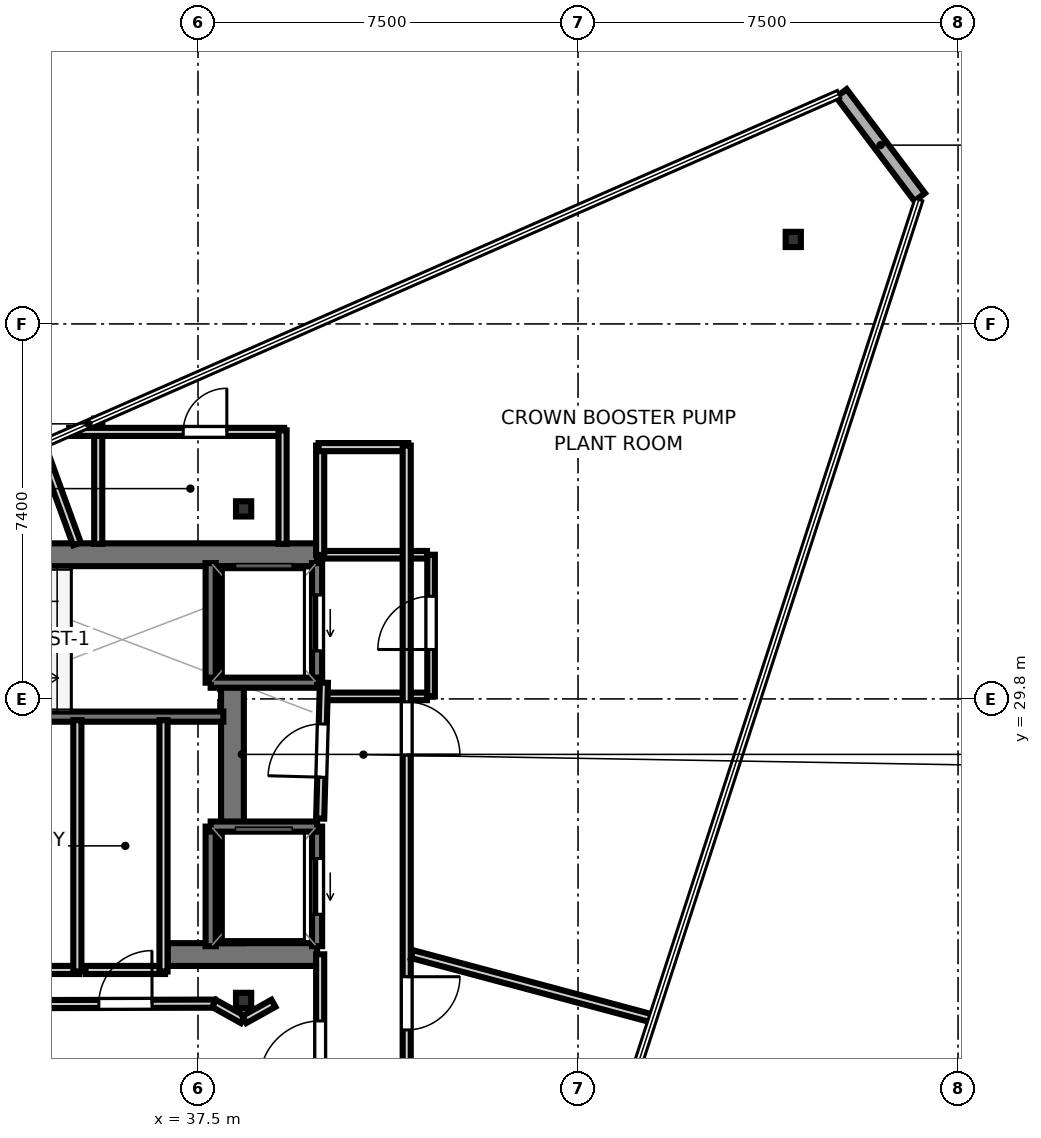
"""IFC4 building model, lengths in metres.
Left out: names, types, materials, properties, quantities, classifications, styles, units other than length and angle.
Written with IfcOpenShell. Run it as: python <this file> out.ifc"""

import sys

from ifc_helpers import new_model, si_unit, direction, frame, frame_2d, origin, origin_2d, place, context, subcontext, project, spatial, rectangle, i_section, extrude, element, fill, save


model = new_model("IFC4")
c1 = context("Model", 3, precision=1e-05, world=origin(), true_north=direction((0.0, 1.0)))
c2 = subcontext(c1, "Body", "Model", "MODEL_VIEW")
j1 = project(units=[si_unit("LENGTHUNIT", "METRE"), si_unit("PLANEANGLEUNIT", "RADIAN")], contexts=[c1])
p1 = place(None, origin())
s1 = spatial("IfcSite", under=j1, at=p1, CompositionType="ELEMENT")
p2 = place(p1, origin())
s2 = spatial("IfcBuilding", under=s1, at=p2, CompositionType="ELEMENT")
p3 = place(p2, frame((0.0, 0.0, 371.3)))
s3 = spatial("IfcBuildingStorey", under=s2, at=p3, CompositionType="ELEMENT", Elevation=371.3)
p4 = place(p3, frame((30.83, 32.645, 0.0), z_axis=(0.0, 0.0, 1.0), x_axis=(1.0, 0.0, 0.0)))
e1 = element("IfcWall", 1, at=p4, inside=s3, PredefinedType="SHEAR", context=c2, shape_type="SweptSolid", body=[
    extrude(rectangle(XDim=9.02, YDim=0.45, at=frame_2d((4.51, 0.0))), origin(), (0.0, 0.0, 1.0), 3.55),
])
p5 = place(p3, frame((36.9, 24.755, 0.0), z_axis=(0.0, 0.0, 1.0), x_axis=(1.0, 0.0, 0.0)))
e2 = element("IfcWall", 2, at=p5, inside=s3, PredefinedType="SHEAR", context=c2, shape_type="SweptSolid", body=[
    extrude(rectangle(XDim=2.95, YDim=0.45, at=frame_2d((1.475, 0.0))), origin(), (0.0, 0.0, 1.0), 3.55),
])
p6 = place(p3, frame((38.18, 24.98, 0.0), z_axis=(0.0, 0.0, 1.0), x_axis=(0.0, 1.0, 0.0)))
e3 = element("IfcWall", 3, at=p6, inside=s3, PredefinedType="SHEAR", context=c2, shape_type="SweptSolid", body=[
    extrude(rectangle(XDim=7.44, YDim=0.45, at=frame_2d((3.72, 0.0))), origin(), (0.0, 0.0, 1.0), 3.55),
])
for number, where, z_axis, x_axis in (
    (4, (38.4, 33.55, 0.0), (0.0, 0.0, 1.0), (1.0, 0.0, 0.0)),
    (5, (38.4, 23.85, 0.0), (0.0, 0.0, 1.0), (1.0, 0.0, 0.0)),
    (6, (49.248, 38.867, 0.0), (0.0, 0.0, 1.0), (1.0, 0.0, 0.0)),
):
    element("IfcColumn", number, at=place(p3, frame(where, z_axis=z_axis, x_axis=x_axis)), inside=s3, PredefinedType="COLUMN", context=c2, shape_type="SweptSolid", body=[
        extrude(i_section(OverallWidth=0.3, OverallDepth=0.3, WebThickness=0.01, FlangeThickness=0.015, at=origin_2d()), origin(), (0.0, 0.0, 1.0), 3.75),
    ])
p7 = place(p3, frame((51.744, 39.702, 0.0), z_axis=(0.0, 0.0, 1.0), x_axis=(-0.601640351367, 0.798767104736, 0.0)))
e7 = element("IfcWall", 7, at=p7, inside=s3, PredefinedType="SOLIDWALL", context=c2, shape_type="SweptSolid", body=[
    extrude(rectangle(XDim=2.57, YDim=0.26, at=frame_2d((1.285, 0.0))), origin(), (0.0, 0.0, 1.0), 3.55),
])
p8 = place(p3, frame((29.7, 29.45, 0.0), z_axis=(0.0, 0.0, 1.0), x_axis=(1.0, 0.0, 0.0)))
e8 = element("IfcWall", 8, at=p8, inside=s3, PredefinedType="SOLIDWALL", context=c2, shape_type="SweptSolid", body=[
    extrude(rectangle(XDim=8.3, YDim=0.2, at=frame_2d((4.15, 0.0))), origin(), (0.0, 0.0, 1.0), 3.55),
])
p9 = place(p8, frame((0.595, 0.0, 0.0)))
e9 = element("IfcOpeningElement", 9, at=p9, cuts=e8, PredefinedType="OPENING", context=c2, shape_type="SweptSolid", body=[
    extrude(rectangle(XDim=1.25, YDim=2.15, at=frame_2d((0.625, 1.075))), frame((0.0, 0.11, 0.0), z_axis=(0.0, -1.0, 0.0), x_axis=(1.0, 0.0, 0.0)), (0.0, 0.0, 1.0), 0.22),
])
p10 = place(p3, frame((39.85, 30.12, 0.0), z_axis=(0.0, 0.0, 1.0), x_axis=(0.0, 1.0, 0.0)))
e10 = element("IfcWall", 10, at=p10, inside=s3, PredefinedType="SOLIDWALL", context=c2, shape_type="SweptSolid", body=[
    extrude(rectangle(XDim=2.36, YDim=0.2, at=frame_2d((1.18, 0.0))), origin(), (0.0, 0.0, 1.0), 3.55),
])
p11 = place(p10, frame((0.63, 0.0, 0.0)))
e11 = element("IfcOpeningElement", 11, at=p11, cuts=e10, PredefinedType="OPENING", context=c2, shape_type="SweptSolid", body=[
    extrude(rectangle(XDim=1.1, YDim=2.15, at=frame_2d((0.55, 1.075))), frame((0.0, 0.11, 0.0), z_axis=(0.0, -1.0, 0.0), x_axis=(1.0, 0.0, 0.0)), (0.0, 0.0, 1.0), 0.22),
])
p12 = place(p3, frame((37.75, 30.12, 0.0), z_axis=(0.0, 0.0, 1.0), x_axis=(0.0, 1.0, 0.0)))
e12 = element("IfcWall", 12, at=p12, inside=s3, PredefinedType="SOLIDWALL", context=c2, shape_type="SweptSolid", body=[
    extrude(rectangle(XDim=2.36, YDim=0.2, at=frame_2d((1.18, 0.0))), origin(), (0.0, 0.0, 1.0), 3.55),
])
p13 = place(p3, frame((37.75, 30.12, 0.0), z_axis=(0.0, 0.0, 1.0), x_axis=(1.0, 0.0, 0.0)))
e13 = element("IfcWall", 13, at=p13, inside=s3, PredefinedType="SOLIDWALL", context=c2, shape_type="SweptSolid", body=[
    extrude(rectangle(XDim=2.1, YDim=0.2, at=frame_2d((1.05, 0.0))), origin(), (0.0, 0.0, 1.0), 3.55),
])
p14 = place(p3, frame((39.85, 24.92, 0.0), z_axis=(0.0, 0.0, 1.0), x_axis=(0.0, 1.0, 0.0)))
e14 = element("IfcWall", 14, at=p14, inside=s3, PredefinedType="SOLIDWALL", context=c2, shape_type="SweptSolid", body=[
    extrude(rectangle(XDim=2.36, YDim=0.2, at=frame_2d((1.18, 0.0))), origin(), (0.0, 0.0, 1.0), 3.55),
])
p15 = place(p14, frame((0.63, 0.0, 0.0)))
e15 = element("IfcOpeningElement", 15, at=p15, cuts=e14, PredefinedType="OPENING", context=c2, shape_type="SweptSolid", body=[
    extrude(rectangle(XDim=1.1, YDim=2.15, at=frame_2d((0.55, 1.075))), frame((0.0, 0.11, 0.0), z_axis=(0.0, -1.0, 0.0), x_axis=(1.0, 0.0, 0.0)), (0.0, 0.0, 1.0), 0.22),
])
p16 = place(p3, frame((37.75, 24.92, 0.0), z_axis=(0.0, 0.0, 1.0), x_axis=(0.0, 1.0, 0.0)))
e16 = element("IfcWall", 16, at=p16, inside=s3, PredefinedType="SOLIDWALL", context=c2, shape_type="SweptSolid", body=[
    extrude(rectangle(XDim=2.36, YDim=0.2, at=frame_2d((1.18, 0.0))), origin(), (0.0, 0.0, 1.0), 3.55),
])
p17 = place(p3, frame((37.75, 27.28, 0.0), z_axis=(0.0, 0.0, 1.0), x_axis=(1.0, 0.0, 0.0)))
e17 = element("IfcWall", 17, at=p17, inside=s3, PredefinedType="SOLIDWALL", context=c2, shape_type="SweptSolid", body=[
    extrude(rectangle(XDim=2.1, YDim=0.2, at=frame_2d((1.05, 0.0))), origin(), (0.0, 0.0, 1.0), 3.55),
])
p18 = place(p3, frame((42.1, 29.85, 0.0), z_axis=(0.0, 0.0, 1.0), x_axis=(0.0, 1.0, 0.0)))
e18 = element("IfcWall", 18, at=p18, inside=s3, PredefinedType="PARTITIONING", context=c2, shape_type="SweptSolid", body=[
    extrude(rectangle(XDim=2.795, YDim=0.15, at=frame_2d((1.397, 0.0))), origin(), (0.0, 0.0, 1.0), 2.87),
])
p19 = place(p18, frame((0.925, 0.0, 0.0)))
e19 = element("IfcOpeningElement", 19, at=p19, cuts=e18, PredefinedType="OPENING", context=c2, shape_type="SweptSolid", body=[
    extrude(rectangle(XDim=1.05, YDim=2.15, at=frame_2d((0.525, 1.075))), frame((0.0, 0.085, 0.0), z_axis=(0.0, -1.0, 0.0), x_axis=(1.0, 0.0, 0.0)), (0.0, 0.0, 1.0), 0.17),
])
for number, where, z_axis, x_axis in (
    (20, (39.96, 29.85, 0.0), (0.0, 0.0, 1.0), (1.0, 0.0, 0.0)),
    (21, (39.96, 32.645, 0.0), (0.0, 0.0, 1.0), (1.0, 0.0, 0.0)),
):
    element("IfcWall", number, at=place(p3, frame(where, z_axis=z_axis, x_axis=x_axis)), inside=s3, PredefinedType="PARTITIONING", context=c2, shape_type="SweptSolid", body=[
        extrude(rectangle(XDim=2.06, YDim=0.15, at=frame_2d((1.03, 0.0))), origin(), (0.0, 0.0, 1.0), 2.87),
    ])
p20 = place(p3, frame((35.15, 24.451, 0.0), z_axis=(0.0, 0.0, 1.0), x_axis=(-1.0, 0.0, 0.0)))
e22 = element("IfcWall", 22, at=p20, inside=s3, PredefinedType="PARTITIONING", context=c2, shape_type="SweptSolid", body=[
    extrude(rectangle(XDim=5.55, YDim=0.16, at=frame_2d((2.775, 0.0))), origin(), (0.0, 0.0, 1.0), 2.87),
])
p21 = place(p3, frame((35.119, 29.38, 0.0), z_axis=(0.0, 0.0, 1.0), x_axis=(0.0, -1.0, 0.0)))
e23 = element("IfcWall", 23, at=p21, inside=s3, PredefinedType="PARTITIONING", context=c2, shape_type="SweptSolid", body=[
    extrude(rectangle(XDim=4.96, YDim=0.16, at=frame_2d((2.48, 0.0))), origin(), (0.0, 0.0, 1.0), 2.08),
])
p22 = place(p3, frame((39.911, 22.05, 0.0), z_axis=(0.0, 0.0, 1.0), x_axis=(0.0, 1.0, 0.0)))
e24 = element("IfcWall", 24, at=p22, inside=s3, PredefinedType="PARTITIONING", context=c2, shape_type="SweptSolid", body=[
    extrude(rectangle(XDim=2.71, YDim=0.16, at=frame_2d((1.355, 0.0))), origin(), (0.0, 0.0, 1.0), 2.87),
])
p23 = place(p22, frame((0.195, 0.0, 0.0)))
e25 = element("IfcOpeningElement", 25, at=p23, cuts=e24, PredefinedType="OPENING", context=c2, shape_type="SweptSolid", body=[
    extrude(rectangle(XDim=1.2, YDim=2.15, at=frame_2d((0.6, 1.075))), frame((0.0, 0.09, 0.0), z_axis=(0.0, -1.0, 0.0), x_axis=(1.0, 0.0, 0.0)), (0.0, 0.0, 1.0), 0.18),
])
p24 = place(p3, frame((39.911, 27.439, 0.0), z_axis=(0.0, 0.0, 1.0), x_axis=(0.027673579092, 0.999617013171, 0.0)))
e26 = element("IfcWall", 26, at=p24, inside=s3, PredefinedType="PARTITIONING", context=c2, shape_type="SweptSolid", body=[
    extrude(rectangle(XDim=2.682, YDim=0.16, at=frame_2d((1.341, 0.0))), origin(), (0.0, 0.0, 1.0), 2.87),
])
p25 = place(p24, frame((0.816, 0.0, 0.0)))
e27 = element("IfcOpeningElement", 27, at=p25, cuts=e26, PredefinedType="OPENING", context=c2, shape_type="SweptSolid", body=[
    extrude(rectangle(XDim=1.05, YDim=2.15, at=frame_2d((0.525, 1.075))), frame((0.0, 0.09, 0.0), z_axis=(0.0, -1.0, 0.0), x_axis=(1.0, 0.0, 0.0)), (0.0, 0.0, 1.0), 0.18),
])
p26 = place(p3, frame((39.911, 32.64, 0.0), z_axis=(0.0, 0.0, 1.0), x_axis=(0.0, 1.0, 0.0)))
e28 = element("IfcWall", 28, at=p26, inside=s3, PredefinedType="PARTITIONING", context=c2, shape_type="SweptSolid", body=[
    extrude(rectangle(XDim=2.16, YDim=0.16, at=frame_2d((1.08, 0.0))), origin(), (0.0, 0.0, 1.0), 2.87),
])
p27 = place(p3, frame((39.88, 34.769, 0.0), z_axis=(0.0, 0.0, 1.0), x_axis=(1.0, 0.0, 0.0)))
e29 = element("IfcWall", 29, at=p27, inside=s3, PredefinedType="PARTITIONING", context=c2, shape_type="SweptSolid", body=[
    extrude(rectangle(XDim=1.77, YDim=0.16, at=frame_2d((0.885, 0.0))), origin(), (0.0, 0.0, 1.0), 2.87),
])
p28 = place(p3, frame((41.619, 34.8, 0.0), z_axis=(0.0, 0.0, 1.0), x_axis=(0.0, -1.0, 0.0)))
e30 = element("IfcWall", 30, at=p28, inside=s3, PredefinedType="PARTITIONING", context=c2, shape_type="SweptSolid", body=[
    extrude(rectangle(XDim=12.75, YDim=0.16, at=frame_2d((6.375, 0.0))), origin(), (0.0, 0.0, 1.0), 2.87),
])
p29 = place(p28, frame((10.482, 0.0, 0.0)))
e31 = element("IfcOpeningElement", 31, at=p29, cuts=e30, PredefinedType="OPENING", context=c2, shape_type="SweptSolid", body=[
    extrude(rectangle(XDim=1.05, YDim=2.15, at=frame_2d((0.525, 1.075))), frame((0.0, 0.09, 0.0), z_axis=(0.0, -1.0, 0.0), x_axis=(1.0, 0.0, 0.0)), (0.0, 0.0, 1.0), 0.18),
])
p30 = place(p28, frame((5.059, 0.0, 0.0)))
e32 = element("IfcOpeningElement", 32, at=p30, cuts=e30, PredefinedType="OPENING", context=c2, shape_type="SweptSolid", body=[
    extrude(rectangle(XDim=1.05, YDim=2.15, at=frame_2d((0.525, 1.075))), frame((0.0, 0.09, 0.0), z_axis=(0.0, -1.0, 0.0), x_axis=(1.0, 0.0, 0.0)), (0.0, 0.0, 1.0), 0.18),
])
p31 = place(p3, frame((36.85, 24.451, 0.0), z_axis=(0.0, 0.0, 1.0), x_axis=(-1.0, 0.0, 0.0)))
e33 = element("IfcWall", 33, at=p31, inside=s3, PredefinedType="PARTITIONING", context=c2, shape_type="SweptSolid", body=[
    extrude(rectangle(XDim=1.57, YDim=0.16, at=frame_2d((0.785, 0.0))), origin(), (0.0, 0.0, 1.0), 2.87),
])
p32 = place(p3, frame((36.819, 29.38, 0.0), z_axis=(0.0, 0.0, 1.0), x_axis=(0.0, -1.0, 0.0)))
e34 = element("IfcWall", 34, at=p32, inside=s3, PredefinedType="PARTITIONING", context=c2, shape_type="SweptSolid", body=[
    extrude(rectangle(XDim=4.96, YDim=0.16, at=frame_2d((2.48, 0.0))), origin(), (0.0, 0.0, 1.0), 2.87),
])
p33 = place(p3, frame((35.531, 32.858, 0.0), z_axis=(0.0, 0.0, 1.0), x_axis=(0.0, 1.0, 0.0)))
e35 = element("IfcWall", 35, at=p33, inside=s3, PredefinedType="PARTITIONING", context=c2, shape_type="SweptSolid", body=[
    extrude(rectangle(XDim=2.474, YDim=0.16, at=frame_2d((1.237, 0.0))), origin(), (0.0, 0.0, 1.0), 2.87),
])
p34 = place(p3, frame((34.957, 35.069, 0.0), z_axis=(0.0, 0.0, 1.0), x_axis=(1.0, 0.0, 0.0)))
e36 = element("IfcWall", 36, at=p34, inside=s3, PredefinedType="PARTITIONING", context=c2, shape_type="SweptSolid", body=[
    extrude(rectangle(XDim=4.243, YDim=0.16, at=frame_2d((2.121, 0.0))), origin(), (0.0, 0.0, 1.0), 2.87),
])
p35 = place(p34, frame((2.251, 0.0, 0.0)))
e37 = element("IfcOpeningElement", 37, at=p35, cuts=e36, PredefinedType="OPENING", context=c2, shape_type="SweptSolid", body=[
    extrude(rectangle(XDim=0.86, YDim=2.05, at=frame_2d((0.43, 1.025))), frame((0.0, 0.09, 0.0), z_axis=(0.0, -1.0, 0.0), x_axis=(1.0, 0.0, 0.0)), (0.0, 0.0, 1.0), 0.18),
])
p36 = place(p3, frame((39.169, 35.1, 0.0), z_axis=(0.0, 0.0, 1.0), x_axis=(0.0, -1.0, 0.0)))
e38 = element("IfcWall", 38, at=p36, inside=s3, PredefinedType="PARTITIONING", context=c2, shape_type="SweptSolid", body=[
    extrude(rectangle(XDim=2.242, YDim=0.16, at=frame_2d((1.121, 0.0))), origin(), (0.0, 0.0, 1.0), 2.87),
])
p37 = place(p3, frame((29.136, 23.764, 0.0), z_axis=(0.0, 0.0, 1.0), x_axis=(0.999996877471, 0.002499009437, 0.0)))
e39 = element("IfcWall", 39, at=p37, inside=s3, PredefinedType="PARTITIONING", context=c2, shape_type="SweptSolid", body=[
    extrude(rectangle(XDim=8.695, YDim=0.16, at=frame_2d((4.347, 0.0))), origin(), (0.0, 0.0, 1.0), 2.87),
])
p38 = place(p37, frame((2.854, 0.0, 0.0)))
e40 = element("IfcOpeningElement", 40, at=p38, cuts=e39, PredefinedType="OPENING", context=c2, shape_type="SweptSolid", body=[
    extrude(rectangle(XDim=1.2, YDim=2.15, at=frame_2d((0.6, 1.075))), frame((0.0, 0.09, 0.0), z_axis=(0.0, -1.0, 0.0), x_axis=(1.0, 0.0, 0.0)), (0.0, 0.0, 1.0), 0.18),
])
p39 = place(p37, frame((6.407, 0.0, 0.0)))
e41 = element("IfcOpeningElement", 41, at=p39, cuts=e39, PredefinedType="OPENING", context=c2, shape_type="SweptSolid", body=[
    extrude(rectangle(XDim=1.05, YDim=2.15, at=frame_2d((0.525, 1.075))), frame((0.0, 0.09, 0.0), z_axis=(0.0, -1.0, 0.0), x_axis=(1.0, 0.0, 0.0)), (0.0, 0.0, 1.0), 0.18),
])
p40 = place(p37, frame((1.454, 0.0, 0.0)))
e42 = element("IfcOpeningElement", 42, at=p40, cuts=e39, PredefinedType="OPENING", context=c2, shape_type="SweptSolid", body=[
    extrude(rectangle(XDim=1.2, YDim=2.15, at=frame_2d((0.6, 1.075))), frame((0.0, 0.09, 0.0), z_axis=(0.0, -1.0, 0.0), x_axis=(1.0, 0.0, 0.0)), (0.0, 0.0, 1.0), 0.18),
])
p41 = place(p3, frame((37.816, 23.79, 0.0), z_axis=(0.0, 0.0, 1.0), x_axis=(0.873431330758, -0.486947338478, 0.0)))
e43 = element("IfcWall", 43, at=p41, inside=s3, PredefinedType="PARTITIONING", context=c2, shape_type="SweptSolid", body=[
    extrude(rectangle(XDim=0.651, YDim=0.16, at=frame_2d((0.326, 0.0))), origin(), (0.0, 0.0, 1.0), 2.87),
])
p42 = place(p3, frame((38.415, 23.473, 0.0), z_axis=(0.0, 0.0, 1.0), x_axis=(0.873120406102, 0.487504621976, 0.0)))
e44 = element("IfcWall", 44, at=p42, inside=s3, PredefinedType="PARTITIONING", context=c2, shape_type="SweptSolid", body=[
    extrude(rectangle(XDim=0.656, YDim=0.16, at=frame_2d((0.328, 0.0))), origin(), (0.0, 0.0, 1.0), 2.87),
])
p43 = place(p3, frame((41.722, 24.764, 0.0), z_axis=(0.0, 0.0, 1.0), x_axis=(0.965929963901, -0.258803602832, 0.0)))
e45 = element("IfcWall", 45, at=p43, inside=s3, PredefinedType="PARTITIONING", context=c2, shape_type="SweptSolid", body=[
    extrude(rectangle(XDim=4.94, YDim=0.16, at=frame_2d((2.47, 0.0))), origin(), (0.0, 0.0, 1.0), 2.87),
])
p44 = place(p3, frame((35.111, 32.858, 0.0), z_axis=(0.0, 0.0, 1.0), x_axis=(-0.342060015432, 0.939678107568, 0.0)))
e46 = element("IfcWall", 46, at=p44, inside=s3, PredefinedType="PARTITIONING", context=c2, shape_type="SweptSolid", body=[
    extrude(rectangle(XDim=2.103, YDim=0.16, at=frame_2d((1.051, 0.0))), origin(), (0.0, 0.0, 1.0), 2.87),
])
p45 = place(p11, origin())
e47 = element("IfcDoor", 47, at=p45, inside=s3, OperationType="SLIDING_TO_LEFT", PredefinedType="DOOR", context=c2, shape_type="SweptSolid", body=[
    extrude(rectangle(XDim=1.1, YDim=2.15, at=frame_2d((0.55, 1.075))), frame((0.0, 0.025, 0.0), z_axis=(0.0, -1.0, 0.0), x_axis=(1.0, 0.0, 0.0)), (0.0, 0.0, 1.0), 0.05),
])
fill(e11, e47)
p46 = place(p15, origin())
e48 = element("IfcDoor", 48, at=p46, inside=s3, OperationType="SLIDING_TO_LEFT", PredefinedType="DOOR", context=c2, shape_type="SweptSolid", body=[
    extrude(rectangle(XDim=1.1, YDim=2.15, at=frame_2d((0.55, 1.075))), frame((0.0, 0.025, 0.0), z_axis=(0.0, -1.0, 0.0), x_axis=(1.0, 0.0, 0.0)), (0.0, 0.0, 1.0), 0.05),
])
fill(e15, e48)
p47 = place(p19, origin())
e49 = element("IfcDoor", 49, at=p47, inside=s3, OperationType="SINGLE_SWING_LEFT", PredefinedType="DOOR", context=c2, shape_type="SweptSolid", body=[
    extrude(rectangle(XDim=1.05, YDim=2.15, at=frame_2d((0.525, 1.075))), frame((0.0, 0.025, 0.0), z_axis=(0.0, -1.0, 0.0), x_axis=(1.0, 0.0, 0.0)), (0.0, 0.0, 1.0), 0.05),
])
fill(e19, e49)
p48 = place(p23, origin())
e50 = element("IfcDoor", 50, at=p48, inside=s3, OperationType="SINGLE_SWING_LEFT", PredefinedType="DOOR", context=c2, shape_type="SweptSolid", body=[
    extrude(rectangle(XDim=1.2, YDim=2.15, at=frame_2d((0.6, 1.075))), frame((0.0, 0.025, 0.0), z_axis=(0.0, -1.0, 0.0), x_axis=(1.0, 0.0, 0.0)), (0.0, 0.0, 1.0), 0.05),
])
fill(e25, e50)
p49 = place(p39, origin())
e51 = element("IfcDoor", 51, at=p49, inside=s3, OperationType="SINGLE_SWING_RIGHT", PredefinedType="DOOR", context=c2, shape_type="SweptSolid", body=[
    extrude(rectangle(XDim=1.05, YDim=2.15, at=frame_2d((0.525, 1.075))), frame((0.0, 0.025, 0.0), z_axis=(0.0, -1.0, 0.0), x_axis=(1.0, 0.0, 0.0)), (0.0, 0.0, 1.0), 0.05),
])
fill(e41, e51)
p50 = place(p29, origin())
e52 = element("IfcDoor", 52, at=p50, inside=s3, OperationType="SINGLE_SWING_LEFT", PredefinedType="DOOR", context=c2, shape_type="SweptSolid", body=[
    extrude(rectangle(XDim=1.05, YDim=2.15, at=frame_2d((0.525, 1.075))), frame((0.0, 0.025, 0.0), z_axis=(0.0, -1.0, 0.0), x_axis=(1.0, 0.0, 0.0)), (0.0, 0.0, 1.0), 0.05),
])
fill(e31, e52)
p51 = place(p30, origin())
e53 = element("IfcDoor", 53, at=p51, inside=s3, OperationType="SINGLE_SWING_RIGHT", PredefinedType="DOOR", context=c2, shape_type="SweptSolid", body=[
    extrude(rectangle(XDim=1.05, YDim=2.15, at=frame_2d((0.525, 1.075))), frame((0.0, 0.025, 0.0), z_axis=(0.0, -1.0, 0.0), x_axis=(1.0, 0.0, 0.0)), (0.0, 0.0, 1.0), 0.05),
])
fill(e32, e53)
p52 = place(p25, origin())
e54 = element("IfcDoor", 54, at=p52, inside=s3, OperationType="SINGLE_SWING_LEFT", PredefinedType="DOOR", context=c2, shape_type="SweptSolid", body=[
    extrude(rectangle(XDim=1.05, YDim=2.15, at=frame_2d((0.525, 1.075))), frame((0.0, 0.025, 0.0), z_axis=(0.0, -1.0, 0.0), x_axis=(1.0, 0.0, 0.0)), (0.0, 0.0, 1.0), 0.05),
])
fill(e27, e54)
p53 = place(p35, origin())
e55 = element("IfcDoor", 55, at=p53, inside=s3, OperationType="SINGLE_SWING_RIGHT", PredefinedType="DOOR", context=c2, shape_type="SweptSolid", body=[
    extrude(rectangle(XDim=0.86, YDim=2.05, at=frame_2d((0.43, 1.025))), frame((0.0, 0.025, 0.0), z_axis=(0.0, -1.0, 0.0), x_axis=(1.0, 0.0, 0.0)), (0.0, 0.0, 1.0), 0.05),
])
fill(e37, e55)
save(model, sys.argv[1])
